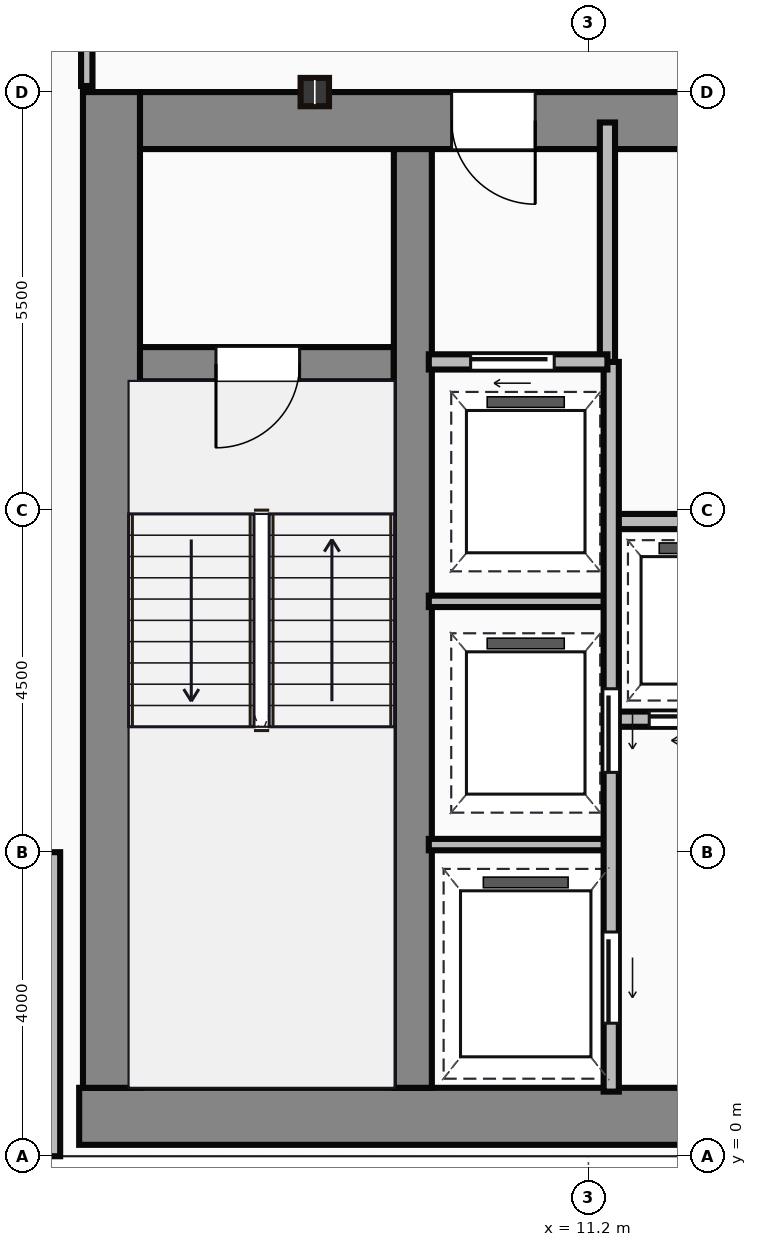
"""IFC4 building model, lengths in metres.
Left out: names, types, materials, properties, quantities, classifications, styles, units other than length and angle.
Written with IfcOpenShell. Run it as: python <this file> out.ifc"""

import sys

from ifc_helpers import new_model, si_unit, direction, frame, frame_2d, origin, origin_2d, place, context, subcontext, project, spatial, rectangle, i_section, extrude, source, transform, mapped, element, fill, save


model = new_model("IFC4")
c1 = context("Model", 3, precision=1e-05, world=origin(), true_north=direction((0.0, 1.0)))
c2 = subcontext(c1, "Body", "Model", "MODEL_VIEW")
j1 = project(units=[si_unit("LENGTHUNIT", "METRE"), si_unit("PLANEANGLEUNIT", "RADIAN")], contexts=[c1])
p1 = place(None, origin())
s1 = spatial("IfcSite", under=j1, at=p1, CompositionType="ELEMENT")
p2 = place(p1, origin())
s2 = spatial("IfcBuilding", under=s1, at=p2, CompositionType="ELEMENT")
p3 = place(p2, frame((0.0, 0.0, 166.15)))
s3 = spatial("IfcBuildingStorey", under=s2, at=p3, CompositionType="ELEMENT", Elevation=166.15)
m1 = source(origin(), c2, "Body", "SweptSolid", [
    extrude(rectangle(XDim=29.5, YDim=0.75, at=frame_2d((14.75, 0.0))), origin(), (0.0, 0.0, 1.0), 3.65),
])
p4 = place(p3, frame((4.5, 0.525, 0.0), z_axis=(0.0, 0.0, 1.0), x_axis=(1.0, 0.0, 0.0)))
e1 = element("IfcWall", 1, at=p4, inside=s3, PredefinedType="SHEAR", context=c2, shape_type="MappedRepresentation", body=[
    mapped(m1, transform((0.0, 0.0, 0.0))),
])
m2 = source(origin(), c2, "Body", "SweptSolid", [
    extrude(rectangle(XDim=13.1, YDim=0.75, at=frame_2d((6.55, 0.0))), origin(), (0.0, 0.0, 1.0), 3.65),
])
p5 = place(p3, frame((4.925, 0.9, 0.0), z_axis=(0.0, 0.0, 1.0), x_axis=(0.0, 1.0, 0.0)))
e2 = element("IfcWall", 2, at=p5, inside=s3, PredefinedType="SHEAR", context=c2, shape_type="MappedRepresentation", body=[
    mapped(m2, transform((0.0, 0.0, 0.0))),
])
m3 = source(origin(), c2, "Body", "SweptSolid", [
    extrude(rectangle(XDim=9.1, YDim=0.75, at=frame_2d((4.55, 0.0))), origin(), (0.0, 0.0, 1.0), 3.65),
])
p6 = place(p3, frame((5.3, 13.625, 0.0), z_axis=(0.0, 0.0, 1.0), x_axis=(1.0, 0.0, 0.0)))
e3 = element("IfcWall", 3, at=p6, inside=s3, PredefinedType="SHEAR", context=c2, shape_type="MappedRepresentation", body=[
    mapped(m3, transform((0.0, 0.0, 0.0))),
])
p7 = place(p6, frame((4.1, 0.0, 0.0)))
e4 = element("IfcOpeningElement", 4, at=p7, cuts=e3, PredefinedType="OPENING", context=c2, shape_type="SweptSolid", body=[
    extrude(rectangle(XDim=1.1, YDim=2.15, at=frame_2d((0.55, 1.075))), frame((0.0, 0.385, 0.0), z_axis=(0.0, -1.0, 0.0), x_axis=(1.0, 0.0, 0.0)), (0.0, 0.0, 1.0), 0.77),
])
m4 = source(origin(), c2, "Body", "SweptSolid", [
    extrude(rectangle(XDim=12.35, YDim=0.5, at=frame_2d((6.175, 0.0))), origin(), (0.0, 0.0, 1.0), 3.65),
])
p8 = place(p3, frame((8.89, 0.9, 0.0), z_axis=(0.0, 0.0, 1.0), x_axis=(0.0, 1.0, 0.0)))
e5 = element("IfcWall", 5, at=p8, inside=s3, PredefinedType="SHEAR", context=c2, shape_type="MappedRepresentation", body=[
    mapped(m4, transform((0.0, 0.0, 0.0))),
])
m5 = source(origin(), c2, "Body", "SweptSolid", [
    extrude(rectangle(XDim=3.39, YDim=0.45, at=frame_2d((1.695, 0.0))), origin(), (0.0, 0.0, 1.0), 3.65),
])
p9 = place(p3, frame((5.25, 10.42, 0.0), z_axis=(0.0, 0.0, 1.0), x_axis=(1.0, 0.0, 0.0)))
e6 = element("IfcWall", 6, at=p9, inside=s3, PredefinedType="SHEAR", context=c2, shape_type="MappedRepresentation", body=[
    mapped(m5, transform((0.0, 0.0, 0.0))),
])
p10 = place(p9, frame((1.05, 0.0, 0.0)))
e7 = element("IfcOpeningElement", 7, at=p10, cuts=e6, PredefinedType="OPENING", context=c2, shape_type="SweptSolid", body=[
    extrude(rectangle(XDim=1.1, YDim=2.15, at=frame_2d((0.55, 1.075))), frame((0.0, 0.235, 0.0), z_axis=(0.0, -1.0, 0.0), x_axis=(1.0, 0.0, 0.0)), (0.0, 0.0, 1.0), 0.47),
])
m6 = source(origin(), c2, "Body", "SweptSolid", [
    extrude(i_section(OverallWidth=0.374, OverallDepth=0.372, WebThickness=0.016, FlangeThickness=0.026, at=origin_2d()), origin(), (0.0, 0.0, 1.0), 3.65),
])
p11 = place(p3, frame((7.6, 14.0, 0.0), z_axis=(0.0, 0.0, 1.0), x_axis=(1.0, 0.0, 0.0)))
e8 = element("IfcColumn", 8, at=p11, inside=s3, PredefinedType="COLUMN", context=c2, shape_type="MappedRepresentation", body=[
    mapped(m6, transform((0.0, 0.0, 0.0))),
])
m7 = source(origin(), c2, "Body", "SweptSolid", [
    extrude(rectangle(XDim=4.0, YDim=0.25, at=frame_2d((2.0, 0.0))), origin(), (0.0, 0.0, 1.0), 3.4),
])
p12 = place(p3, frame((4.125, 4.0, 0.0), z_axis=(0.0, 0.0, 1.0), x_axis=(0.0, -1.0, 0.0)))
e9 = element("IfcWall", 9, at=p12, inside=s3, PredefinedType="STANDARD", context=c2, shape_type="MappedRepresentation", body=[
    mapped(m7, transform((0.0, 0.0, 0.0))),
])
m8 = source(origin(), c2, "Body", "SweptSolid", [
    extrude(rectangle(XDim=3.18, YDim=0.2, at=frame_2d((1.59, 0.0))), origin(), (0.0, 0.0, 1.0), 3.4),
])
p13 = place(p3, frame((11.45, 10.42, 0.0), z_axis=(0.0, 0.0, 1.0), x_axis=(0.0, 1.0, 0.0)))
e10 = element("IfcWall", 10, at=p13, inside=s3, PredefinedType="PARTITIONING", context=c2, shape_type="MappedRepresentation", body=[
    mapped(m8, transform((0.0, 0.0, 0.0))),
])
m9 = source(origin(), c2, "Body", "SweptSolid", [
    extrude(rectangle(XDim=2.35, YDim=0.2, at=frame_2d((1.175, 0.0))), origin(), (0.0, 0.0, 1.0), 3.4),
])
p14 = place(p3, frame((9.1, 10.45, 0.0), z_axis=(0.0, 0.0, 1.0), x_axis=(1.0, 0.0, 0.0)))
e11 = element("IfcWall", 11, at=p14, inside=s3, PredefinedType="PARTITIONING", context=c2, shape_type="MappedRepresentation", body=[
    mapped(m9, transform((0.0, 0.0, 0.0))),
])
p15 = place(p14, frame((0.55, 0.0, 0.0)))
e12 = element("IfcOpeningElement", 12, at=p15, cuts=e11, PredefinedType="OPENING", context=c2, shape_type="SweptSolid", body=[
    extrude(rectangle(XDim=1.1, YDim=2.15, at=frame_2d((0.55, 1.075))), frame((0.0, 0.11, 0.0), z_axis=(0.0, -1.0, 0.0), x_axis=(1.0, 0.0, 0.0)), (0.0, 0.0, 1.0), 0.22),
])
m10 = source(origin(), c2, "Body", "SweptSolid", [
    extrude(rectangle(XDim=9.6, YDim=0.2, at=frame_2d((4.8, 0.0))), origin(), (0.0, 0.0, 1.0), 3.4),
])
p16 = place(p3, frame((11.5, 0.85, 0.0), z_axis=(0.0, 0.0, 1.0), x_axis=(0.0, 1.0, 0.0)))
e13 = element("IfcWall", 13, at=p16, inside=s3, PredefinedType="PARTITIONING", context=c2, shape_type="MappedRepresentation", body=[
    mapped(m10, transform((0.0, 0.0, 0.0))),
])
p17 = place(p16, frame((4.2, 0.0, 0.0)))
e14 = element("IfcOpeningElement", 14, at=p17, cuts=e13, PredefinedType="OPENING", context=c2, shape_type="SweptSolid", body=[
    extrude(rectangle(XDim=1.1, YDim=2.15, at=frame_2d((0.55, 1.075))), frame((0.0, 0.11, 0.0), z_axis=(0.0, -1.0, 0.0), x_axis=(1.0, 0.0, 0.0)), (0.0, 0.0, 1.0), 0.22),
])
p18 = place(p16, frame((0.9, 0.0, 0.0)))
e15 = element("IfcOpeningElement", 15, at=p18, cuts=e13, PredefinedType="OPENING", context=c2, shape_type="SweptSolid", body=[
    extrude(rectangle(XDim=1.2, YDim=2.15, at=frame_2d((0.6, 1.075))), frame((0.0, 0.11, 0.0), z_axis=(0.0, -1.0, 0.0), x_axis=(1.0, 0.0, 0.0)), (0.0, 0.0, 1.0), 0.22),
])
m11 = source(origin(), c2, "Body", "SweptSolid", [
    extrude(rectangle(XDim=2.4, YDim=0.15, at=frame_2d((1.2, 0.0))), origin(), (0.0, 0.0, 1.0), 3.4),
])
for number, where, z_axis, x_axis in (
    (16, (9.1, 4.1, 0.0), (0.0, 0.0, 1.0), (1.0, 0.0, 0.0)),
    (17, (9.1, 7.3, 0.0), (0.0, 0.0, 1.0), (1.0, 0.0, 0.0)),
):
    element("IfcWall", number, at=place(p3, frame(where, z_axis=z_axis, x_axis=x_axis)), inside=s3, PredefinedType="PARTITIONING", context=c2, shape_type="MappedRepresentation", body=[
        mapped(m11, transform((0.0, 0.0, 0.0))),
    ])
m12 = source(origin(), c2, "Body", "SweptSolid", [
    extrude(rectangle(XDim=11.85, YDim=0.2, at=frame_2d((5.925, 0.0))), origin(), (0.0, 0.0, 1.0), 3.4),
])
p19 = place(p3, frame((11.55, 5.75, 0.0), z_axis=(0.0, 0.0, 1.0), x_axis=(1.0, 0.0, 0.0)))
e18 = element("IfcWall", 18, at=p19, inside=s3, PredefinedType="PARTITIONING", context=c2, shape_type="MappedRepresentation", body=[
    mapped(m12, transform((0.0, 0.0, 0.0))),
])
p20 = place(p19, frame((0.45, 0.0, 0.0)))
e19 = element("IfcOpeningElement", 19, at=p20, cuts=e18, PredefinedType="OPENING", context=c2, shape_type="SweptSolid", body=[
    extrude(rectangle(XDim=1.05, YDim=2.15, at=frame_2d((0.525, 1.075))), frame((0.0, 0.11, 0.0), z_axis=(0.0, -1.0, 0.0), x_axis=(1.0, 0.0, 0.0)), (0.0, 0.0, 1.0), 0.22),
])
p21 = place(p19, frame((2.4, 0.0, 0.0)))
e20 = element("IfcOpeningElement", 20, at=p21, cuts=e18, PredefinedType="OPENING", context=c2, shape_type="SweptSolid", body=[
    extrude(rectangle(XDim=1.05, YDim=2.15, at=frame_2d((0.525, 1.075))), frame((0.0, 0.11, 0.0), z_axis=(0.0, -1.0, 0.0), x_axis=(1.0, 0.0, 0.0)), (0.0, 0.0, 1.0), 0.22),
])
p22 = place(p19, frame((4.35, 0.0, 0.0)))
e21 = element("IfcOpeningElement", 21, at=p22, cuts=e18, PredefinedType="OPENING", context=c2, shape_type="SweptSolid", body=[
    extrude(rectangle(XDim=1.05, YDim=2.15, at=frame_2d((0.525, 1.075))), frame((0.0, 0.11, 0.0), z_axis=(0.0, -1.0, 0.0), x_axis=(1.0, 0.0, 0.0)), (0.0, 0.0, 1.0), 0.22),
])
p23 = place(p19, frame((6.3, 0.0, 0.0)))
e22 = element("IfcOpeningElement", 22, at=p23, cuts=e18, PredefinedType="OPENING", context=c2, shape_type="SweptSolid", body=[
    extrude(rectangle(XDim=1.05, YDim=2.15, at=frame_2d((0.525, 1.075))), frame((0.0, 0.11, 0.0), z_axis=(0.0, -1.0, 0.0), x_axis=(1.0, 0.0, 0.0)), (0.0, 0.0, 1.0), 0.22),
])
p24 = place(p19, frame((8.25, 0.0, 0.0)))
e23 = element("IfcOpeningElement", 23, at=p24, cuts=e18, PredefinedType="OPENING", context=c2, shape_type="SweptSolid", body=[
    extrude(rectangle(XDim=1.05, YDim=2.15, at=frame_2d((0.525, 1.075))), frame((0.0, 0.11, 0.0), z_axis=(0.0, -1.0, 0.0), x_axis=(1.0, 0.0, 0.0)), (0.0, 0.0, 1.0), 0.22),
])
p25 = place(p19, frame((10.2, 0.0, 0.0)))
e24 = element("IfcOpeningElement", 24, at=p25, cuts=e18, PredefinedType="OPENING", context=c2, shape_type="SweptSolid", body=[
    extrude(rectangle(XDim=1.05, YDim=2.15, at=frame_2d((0.525, 1.075))), frame((0.0, 0.11, 0.0), z_axis=(0.0, -1.0, 0.0), x_axis=(1.0, 0.0, 0.0)), (0.0, 0.0, 1.0), 0.22),
])
p26 = place(p3, frame((11.55, 8.35, 0.0), z_axis=(0.0, 0.0, 1.0), x_axis=(1.0, 0.0, 0.0)))
e25 = element("IfcWall", 25, at=p26, inside=s3, PredefinedType="PARTITIONING", context=c2, shape_type="MappedRepresentation", body=[
    mapped(m12, transform((0.0, 0.0, 0.0))),
])
m13 = source(origin(), c2, "Body", "SweptSolid", [
    extrude(rectangle(XDim=2.22, YDim=0.15, at=frame_2d((1.11, 0.0))), origin(), (0.0, 0.0, 1.0), 3.4),
])
p27 = place(p3, frame((4.6, 14.08, 0.0), z_axis=(0.0, 0.0, 1.0), x_axis=(0.0, 1.0, 0.0)))
e26 = element("IfcWall", 26, at=p27, inside=s3, PredefinedType="PARTITIONING", context=c2, shape_type="MappedRepresentation", body=[
    mapped(m13, transform((0.0, 0.0, 0.0))),
])
m14 = source(origin(), c2, "Body", "SweptSolid", [
    extrude(rectangle(XDim=1.1, YDim=2.15, at=frame_2d((0.55, 1.075))), frame((0.0, 0.025, 0.0), z_axis=(0.0, -1.0, 0.0), x_axis=(1.0, 0.0, 0.0)), (0.0, 0.0, 1.0), 0.05),
])
p28 = place(p10, frame((1.1, 0.0, 0.0), z_axis=(0.0, 0.0, 1.0), x_axis=(-1.0, 0.0, 0.0)))
e27 = element("IfcDoor", 27, at=p28, inside=s3, OperationType="SINGLE_SWING_LEFT", PredefinedType="DOOR", context=c2, shape_type="MappedRepresentation", body=[
    mapped(m14, transform((0.0, 0.0, 0.0))),
])
fill(e7, e27)
p29 = place(p7, origin())
e28 = element("IfcDoor", 28, at=p29, inside=s3, OperationType="SINGLE_SWING_RIGHT", PredefinedType="DOOR", context=c2, shape_type="MappedRepresentation", body=[
    mapped(m14, transform((0.0, 0.0, 0.0))),
])
fill(e4, e28)
p30 = place(p15, origin())
e29 = element("IfcDoor", 29, at=p30, inside=s3, OperationType="SLIDING_TO_LEFT", PredefinedType="DOOR", context=c2, shape_type="MappedRepresentation", body=[
    mapped(m14, transform((0.0, 0.0, 0.0))),
])
fill(e12, e29)
p31 = place(p17, frame((1.1, 0.0, 0.0), z_axis=(0.0, 0.0, 1.0), x_axis=(-1.0, 0.0, 0.0)))
e30 = element("IfcDoor", 30, at=p31, inside=s3, OperationType="SLIDING_TO_LEFT", PredefinedType="DOOR", context=c2, shape_type="MappedRepresentation", body=[
    mapped(m14, transform((0.0, 0.0, 0.0))),
])
fill(e14, e30)
m15 = source(origin(), c2, "Body", "SweptSolid", [
    extrude(rectangle(XDim=1.2, YDim=2.15, at=frame_2d((0.6, 1.075))), frame((0.0, 0.025, 0.0), z_axis=(0.0, -1.0, 0.0), x_axis=(1.0, 0.0, 0.0)), (0.0, 0.0, 1.0), 0.05),
])
p32 = place(p18, frame((1.2, 0.0, 0.0), z_axis=(0.0, 0.0, 1.0), x_axis=(-1.0, 0.0, 0.0)))
e31 = element("IfcDoor", 31, at=p32, inside=s3, OperationType="SLIDING_TO_LEFT", PredefinedType="DOOR", context=c2, shape_type="MappedRepresentation", body=[
    mapped(m15, transform((0.0, 0.0, 0.0))),
])
fill(e15, e31)
m16 = source(origin(), c2, "Body", "SweptSolid", [
    extrude(rectangle(XDim=1.05, YDim=2.15, at=frame_2d((0.525, 1.075))), frame((0.0, 0.025, 0.0), z_axis=(0.0, -1.0, 0.0), x_axis=(1.0, 0.0, 0.0)), (0.0, 0.0, 1.0), 0.05),
])
p33 = place(p20, frame((1.05, 0.0, 0.0), z_axis=(0.0, 0.0, 1.0), x_axis=(-1.0, 0.0, 0.0)))
e32 = element("IfcDoor", 32, at=p33, inside=s3, OperationType="SLIDING_TO_LEFT", PredefinedType="DOOR", context=c2, shape_type="MappedRepresentation", body=[
    mapped(m16, transform((0.0, 0.0, 0.0))),
])
fill(e19, e32)
save(model, sys.argv[1])
